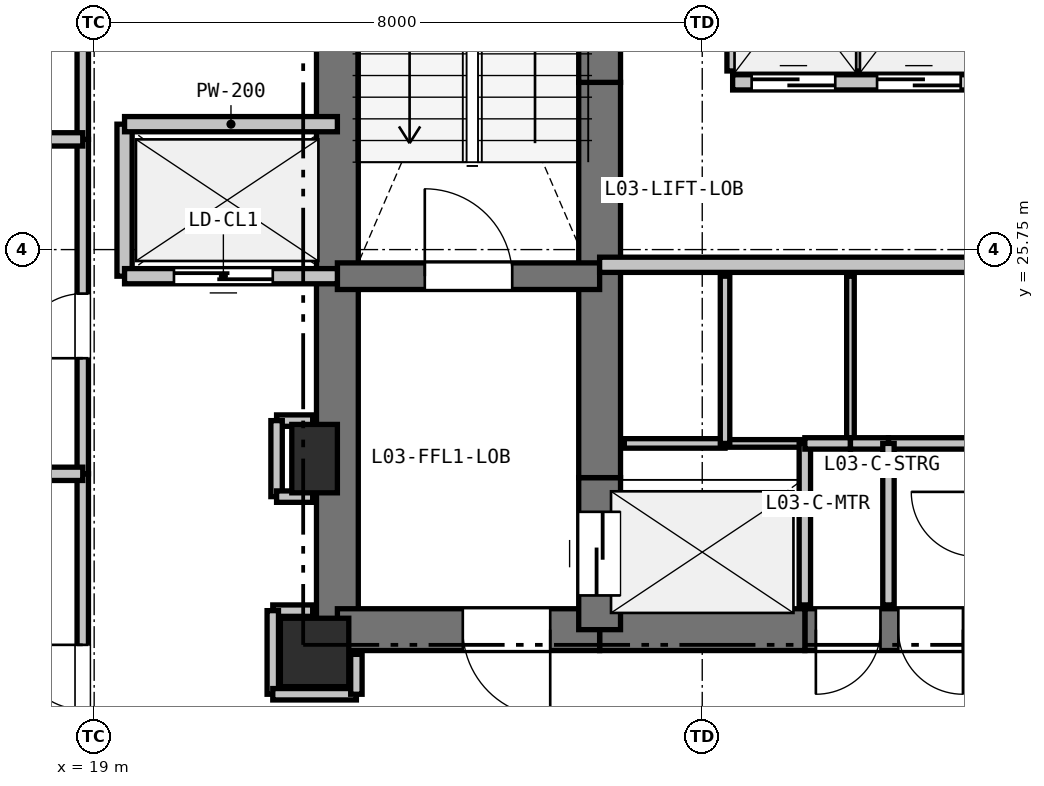
"""IFC4 building model, lengths in metres.
Left out: names, types, materials, properties, quantities, classifications, styles, units other than length and angle.
Written with IfcOpenShell. Run it as: python <this file> out.ifc"""

import sys

from ifc_helpers import new_model, si_unit, direction, frame, frame_2d, origin, origin_2d, place, context, subcontext, project, spatial, rectangle, extrude, element, fill, save


model = new_model("IFC4")
c1 = context("Model", 3, precision=1e-05, world=origin(), true_north=direction((0.0, 1.0)))
c2 = subcontext(c1, "Body", "Model", "MODEL_VIEW")
j1 = project(units=[si_unit("LENGTHUNIT", "METRE"), si_unit("PLANEANGLEUNIT", "RADIAN")], contexts=[c1])
p1 = place(None, origin())
s1 = spatial("IfcSite", under=j1, at=p1, CompositionType="ELEMENT")
p2 = place(p1, origin())
s2 = spatial("IfcBuilding", under=s1, at=p2, CompositionType="ELEMENT")
p3 = place(p2, frame((0.0, 0.0, 14.4)))
s3 = spatial("IfcBuildingStorey", under=s2, at=p3, CompositionType="ELEMENT", Elevation=14.4)
p4 = place(p3, frame((21.9, 20.45, 0.0), z_axis=(0.0, 0.0, 1.0), x_axis=(1.0, 0.0, 0.0)))
e1 = element("IfcColumn", 1, at=p4, inside=s3, PredefinedType="COLUMN", context=c2, shape_type="SweptSolid", body=[
    extrude(rectangle(XDim=0.9, YDim=0.9, at=origin_2d()), origin(), (0.0, 0.0, 1.0), 4.8),
])
p5 = place(p3, frame((21.9, 23.0, 0.0), z_axis=(0.0, 0.0, 1.0), x_axis=(1.0, 0.0, 0.0)))
e2 = element("IfcColumn", 2, at=p5, inside=s3, PredefinedType="PILASTER", context=c2, shape_type="SweptSolid", body=[
    extrude(rectangle(XDim=0.6, YDim=0.9, at=origin_2d()), origin(), (0.0, 0.0, 1.0), 4.8),
])
p6 = place(p3, frame((22.2, 20.75, 0.0), z_axis=(0.0, 0.0, 1.0), x_axis=(0.0, 1.0, 0.0)))
e3 = element("IfcWall", 3, at=p6, inside=s3, PredefinedType="SHEAR", context=c2, shape_type="SweptSolid", body=[
    extrude(rectangle(XDim=4.65, YDim=0.55, at=frame_2d((2.325, 0.0))), origin(), (0.0, 0.0, 1.0), 4.52),
])
p7 = place(p3, frame((22.2, 25.4, 0.0), z_axis=(0.0, 0.0, 1.0), x_axis=(0.0, 1.0, 0.0)))
e4 = element("IfcWall", 4, at=p7, inside=s3, PredefinedType="SHEAR", context=c2, shape_type="SweptSolid", body=[
    extrude(rectangle(XDim=7.35, YDim=0.55, at=frame_2d((3.675, 0.0))), origin(), (0.0, 0.0, 1.0), 4.52),
])
p8 = place(p3, frame((30.6, 20.75, 0.0), z_axis=(0.0, 0.0, 1.0), x_axis=(-1.0, 0.0, 0.0)))
e5 = element("IfcWall", 5, at=p8, inside=s3, PredefinedType="SHEAR", context=c2, shape_type="SweptSolid", body=[
    extrude(rectangle(XDim=2.25, YDim=0.55, at=frame_2d((1.125, 0.0))), origin(), (0.0, 0.0, 1.0), 4.52),
])
p9 = place(p8, frame((1.255, 0.0, 0.0)))
e6 = element("IfcOpeningElement", 6, at=p9, cuts=e5, PredefinedType="OPENING", context=c2, shape_type="SweptSolid", body=[
    extrude(rectangle(XDim=0.85, YDim=2.1, at=frame_2d((0.425, 1.05))), frame((0.0, 0.285, 0.0), z_axis=(0.0, -1.0, 0.0), x_axis=(1.0, 0.0, 0.0)), (0.0, 0.0, 1.0), 0.57),
])
p10 = place(p8, frame((0.17, 0.0, 0.0)))
e7 = element("IfcOpeningElement", 7, at=p10, cuts=e5, PredefinedType="OPENING", context=c2, shape_type="SweptSolid", body=[
    extrude(rectangle(XDim=0.85, YDim=2.1, at=frame_2d((0.425, 1.05))), frame((0.0, 0.285, 0.0), z_axis=(0.0, -1.0, 0.0), x_axis=(1.0, 0.0, 0.0)), (0.0, 0.0, 1.0), 0.57),
])
p11 = place(p3, frame((28.35, 20.75, 0.0), z_axis=(0.0, 0.0, 1.0), x_axis=(-1.0, 0.0, 0.0)))
e8 = element("IfcWall", 8, at=p11, inside=s3, PredefinedType="SHEAR", context=c2, shape_type="SweptSolid", body=[
    extrude(rectangle(XDim=2.7, YDim=0.55, at=frame_2d((1.35, 0.0))), origin(), (0.0, 0.0, 1.0), 4.52),
])
p12 = place(p3, frame((25.65, 20.75, 0.0), z_axis=(0.0, 0.0, 1.0), x_axis=(-1.0, 0.0, 0.0)))
e9 = element("IfcWall", 9, at=p12, inside=s3, PredefinedType="SHEAR", context=c2, shape_type="SweptSolid", body=[
    extrude(rectangle(XDim=3.45, YDim=0.55, at=frame_2d((1.725, 0.0))), origin(), (0.0, 0.0, 1.0), 4.52),
])
p13 = place(p12, frame((0.65, 0.0, 0.0)))
e10 = element("IfcOpeningElement", 10, at=p13, cuts=e9, PredefinedType="OPENING", context=c2, shape_type="SweptSolid", body=[
    extrude(rectangle(XDim=1.15, YDim=2.15, at=frame_2d((0.575, 1.075))), frame((0.0, 0.285, 0.0), z_axis=(0.0, -1.0, 0.0), x_axis=(1.0, 0.0, 0.0)), (0.0, 0.0, 1.0), 0.57),
])
p14 = place(p3, frame((25.65, 20.75, 0.0), z_axis=(0.0, 0.0, 1.0), x_axis=(0.0, 1.0, 0.0)))
e11 = element("IfcWall", 11, at=p14, inside=s3, PredefinedType="SHEAR", context=c2, shape_type="SweptSolid", body=[
    extrude(rectangle(XDim=2.0, YDim=0.55, at=frame_2d((1.0, 0.0))), origin(), (0.0, 0.0, 1.0), 4.52),
])
p15 = place(p14, frame((0.45, 0.0, 0.0)))
e12 = element("IfcOpeningElement", 12, at=p15, cuts=e11, PredefinedType="OPENING", context=c2, shape_type="SweptSolid", body=[
    extrude(rectangle(XDim=1.1, YDim=2.15, at=frame_2d((0.55, 1.075))), frame((0.0, 0.285, 0.0), z_axis=(0.0, -1.0, 0.0), x_axis=(1.0, 0.0, 0.0)), (0.0, 0.0, 1.0), 0.57),
])
p16 = place(p3, frame((25.65, 22.75, 0.0), z_axis=(0.0, 0.0, 1.0), x_axis=(0.0, 1.0, 0.0)))
e13 = element("IfcWall", 13, at=p16, inside=s3, PredefinedType="SHEAR", context=c2, shape_type="SweptSolid", body=[
    extrude(rectangle(XDim=2.8, YDim=0.55, at=frame_2d((1.4, 0.0))), origin(), (0.0, 0.0, 1.0), 4.52),
])
p17 = place(p3, frame((25.65, 25.55, 0.0), z_axis=(0.0, 0.0, 1.0), x_axis=(0.0, 1.0, 0.0)))
e14 = element("IfcWall", 14, at=p17, inside=s3, PredefinedType="SHEAR", context=c2, shape_type="SweptSolid", body=[
    extrude(rectangle(XDim=2.4, YDim=0.55, at=frame_2d((1.2, 0.0))), origin(), (0.0, 0.0, 1.0), 4.52),
])
p18 = place(p3, frame((25.65, 27.95, 0.0), z_axis=(0.0, 0.0, 1.0), x_axis=(0.0, 1.0, 0.0)))
e15 = element("IfcWall", 15, at=p18, inside=s3, PredefinedType="SHEAR", context=c2, shape_type="SweptSolid", body=[
    extrude(rectangle(XDim=4.8, YDim=0.55, at=frame_2d((2.4, 0.0))), origin(), (0.0, 0.0, 1.0), 4.52),
])
p19 = place(p3, frame((22.2, 25.4, 0.0), z_axis=(0.0, 0.0, 1.0), x_axis=(1.0, 0.0, 0.0)))
e16 = element("IfcWall", 16, at=p19, inside=s3, PredefinedType="SHEAR", context=c2, shape_type="SweptSolid", body=[
    extrude(rectangle(XDim=3.45, YDim=0.35, at=frame_2d((1.725, 0.0))), origin(), (0.0, 0.0, 1.0), 4.52),
])
p20 = place(p19, frame((1.15, 0.0, 0.0)))
e17 = element("IfcOpeningElement", 17, at=p20, cuts=e16, PredefinedType="OPENING", context=c2, shape_type="SweptSolid", body=[
    extrude(rectangle(XDim=1.15, YDim=2.15, at=frame_2d((0.575, 1.075))), frame((0.0, 0.185, 0.0), z_axis=(0.0, -1.0, 0.0), x_axis=(1.0, 0.0, 0.0)), (0.0, 0.0, 1.0), 0.37),
])
p21 = place(p3, frame((25.65, 25.55, 0.0), z_axis=(0.0, 0.0, 1.0), x_axis=(1.0, 0.0, 0.0)))
e18 = element("IfcWall", 18, at=p21, inside=s3, PredefinedType="PARTITIONING", context=c2, shape_type="SweptSolid", body=[
    extrude(rectangle(XDim=4.95, YDim=0.2, at=frame_2d((2.475, 0.0))), origin(), (0.0, 0.0, 1.0), 4.52),
])
p22 = place(p3, frame((27.4, 27.95, 0.0), z_axis=(0.0, 0.0, 1.0), x_axis=(1.0, 0.0, 0.0)))
e19 = element("IfcWall", 19, at=p22, inside=s3, PredefinedType="PARTITIONING", context=c2, shape_type="SweptSolid", body=[
    extrude(rectangle(XDim=4.95, YDim=0.2, at=frame_2d((2.475, 0.0))), origin(), (0.0, 0.0, 1.0), 4.52),
])
p23 = place(p22, frame((0.25, 0.0, 0.0)))
e20 = element("IfcOpeningElement", 20, at=p23, cuts=e19, PredefinedType="OPENING", context=c2, shape_type="SweptSolid", body=[
    extrude(rectangle(XDim=1.1, YDim=2.15, at=frame_2d((0.55, 1.075))), frame((0.0, 0.11, 0.0), z_axis=(0.0, -1.0, 0.0), x_axis=(1.0, 0.0, 0.0)), (0.0, 0.0, 1.0), 0.22),
])
p24 = place(p22, frame((1.9, 0.0, 0.0)))
e21 = element("IfcOpeningElement", 21, at=p24, cuts=e19, PredefinedType="OPENING", context=c2, shape_type="SweptSolid", body=[
    extrude(rectangle(XDim=1.1, YDim=2.15, at=frame_2d((0.55, 1.075))), frame((0.0, 0.11, 0.0), z_axis=(0.0, -1.0, 0.0), x_axis=(1.0, 0.0, 0.0)), (0.0, 0.0, 1.0), 0.22),
])
p25 = place(p22, frame((3.55, 0.0, 0.0)))
e22 = element("IfcOpeningElement", 22, at=p25, cuts=e19, PredefinedType="OPENING", context=c2, shape_type="SweptSolid", body=[
    extrude(rectangle(XDim=1.1, YDim=2.15, at=frame_2d((0.55, 1.075))), frame((0.0, 0.11, 0.0), z_axis=(0.0, -1.0, 0.0), x_axis=(1.0, 0.0, 0.0)), (0.0, 0.0, 1.0), 0.22),
])
p26 = place(p3, frame((19.4, 25.4, 0.0), z_axis=(0.0, 0.0, 1.0), x_axis=(0.0, 1.0, 0.0)))
e23 = element("IfcWall", 23, at=p26, inside=s3, PredefinedType="PARTITIONING", context=c2, shape_type="SweptSolid", body=[
    extrude(rectangle(XDim=2.0, YDim=0.2, at=frame_2d((1.0, 0.0))), origin(), (0.0, 0.0, 1.0), 4.52),
])
p27 = place(p3, frame((19.4, 27.4, 0.0), z_axis=(0.0, 0.0, 1.0), x_axis=(1.0, 0.0, 0.0)))
e24 = element("IfcWall", 24, at=p27, inside=s3, PredefinedType="PARTITIONING", context=c2, shape_type="SweptSolid", body=[
    extrude(rectangle(XDim=2.8, YDim=0.2, at=frame_2d((1.4, 0.0))), origin(), (0.0, 0.0, 1.0), 3.969),
])
p28 = place(p3, frame((22.2, 25.4, 0.0), z_axis=(0.0, 0.0, 1.0), x_axis=(-1.0, 0.0, 0.0)))
e25 = element("IfcWall", 25, at=p28, inside=s3, PredefinedType="PARTITIONING", context=c2, shape_type="SweptSolid", body=[
    extrude(rectangle(XDim=2.8, YDim=0.2, at=frame_2d((1.4, 0.0))), origin(), (0.0, 0.0, 1.0), 3.969),
])
p29 = place(p28, frame((0.85, 0.0, 0.0)))
e26 = element("IfcOpeningElement", 26, at=p29, cuts=e25, PredefinedType="OPENING", context=c2, shape_type="SweptSolid", body=[
    extrude(rectangle(XDim=1.3, YDim=2.2, at=frame_2d((0.65, 1.1))), frame((0.0, 0.11, 0.0), z_axis=(0.0, -1.0, 0.0), x_axis=(1.0, 0.0, 0.0)), (0.0, 0.0, 1.0), 0.22),
])
p30 = place(p3, frame((25.975, 23.2, 0.0), z_axis=(0.0, 0.0, 1.0), x_axis=(1.0, 0.0, 0.0)))
e27 = element("IfcWall", 27, at=p30, inside=s3, PredefinedType="PARTITIONING", context=c2, shape_type="SweptSolid", body=[
    extrude(rectangle(XDim=1.325, YDim=0.125, at=frame_2d((0.663, 0.0))), origin(), (0.0, 0.0, 1.0), 4.52),
])
p31 = place(p3, frame((27.3, 23.2, 0.0), z_axis=(0.0, 0.0, 1.0), x_axis=(1.0, 0.0, 0.0)))
e28 = element("IfcWall", 28, at=p31, inside=s3, PredefinedType="PARTITIONING", context=c2, shape_type="SweptSolid", body=[
    extrude(rectangle(XDim=1.05, YDim=0.1, at=frame_2d((0.525, 0.0))), origin(), (0.0, 0.0, 1.0), 4.52),
])
p32 = place(p3, frame((28.35, 23.2, 0.0), z_axis=(0.0, 0.0, 1.0), x_axis=(0.0, -1.0, 0.0)))
e29 = element("IfcWall", 29, at=p32, inside=s3, PredefinedType="PARTITIONING", context=c2, shape_type="SweptSolid", body=[
    extrude(rectangle(XDim=2.125, YDim=0.15, at=frame_2d((1.062, 0.0))), origin(), (0.0, 0.0, 1.0), 4.52),
])
p33 = place(p3, frame((27.3, 25.4, 0.0), z_axis=(0.0, 0.0, 1.0), x_axis=(0.0, -1.0, 0.0)))
e30 = element("IfcWall", 30, at=p33, inside=s3, PredefinedType="PARTITIONING", context=c2, shape_type="SweptSolid", body=[
    extrude(rectangle(XDim=2.2, YDim=0.125, at=frame_2d((1.1, 0.0))), origin(), (0.0, 0.0, 1.0), 4.52),
])
p34 = place(p3, frame((28.95, 25.4, 0.0), z_axis=(0.0, 0.0, 1.0), x_axis=(0.0, -1.0, 0.0)))
e31 = element("IfcWall", 31, at=p34, inside=s3, PredefinedType="PARTITIONING", context=c2, shape_type="SweptSolid", body=[
    extrude(rectangle(XDim=2.2, YDim=0.1, at=frame_2d((1.1, 0.0))), origin(), (0.0, 0.0, 1.0), 4.52),
])
p35 = place(p3, frame((28.95, 23.2, 0.0), z_axis=(0.0, 0.0, 1.0), x_axis=(-1.0, 0.0, 0.0)))
e32 = element("IfcWall", 32, at=p35, inside=s3, PredefinedType="PARTITIONING", context=c2, shape_type="SweptSolid", body=[
    extrude(rectangle(XDim=0.6, YDim=0.15, at=frame_2d((0.3, 0.0))), origin(), (0.0, 0.0, 1.0), 4.52),
])
p36 = place(p3, frame((30.6, 23.2, 0.0), z_axis=(0.0, 0.0, 1.0), x_axis=(-1.0, 0.0, 0.0)))
e33 = element("IfcWall", 33, at=p36, inside=s3, PredefinedType="PARTITIONING", context=c2, shape_type="SweptSolid", body=[
    extrude(rectangle(XDim=1.15, YDim=0.15, at=frame_2d((0.575, 0.0))), origin(), (0.0, 0.0, 1.0), 4.52),
])
p37 = place(p3, frame((29.45, 23.2, 0.0), z_axis=(0.0, 0.0, 1.0), x_axis=(-1.0, 0.0, 0.0)))
e34 = element("IfcWall", 34, at=p37, inside=s3, PredefinedType="PARTITIONING", context=c2, shape_type="SweptSolid", body=[
    extrude(rectangle(XDim=0.5, YDim=0.15, at=frame_2d((0.25, 0.0))), origin(), (0.0, 0.0, 1.0), 4.52),
])
p38 = place(p3, frame((29.05, 30.3, 0.0), z_axis=(0.0, 0.0, 1.0), x_axis=(0.0, -1.0, 0.0)))
e35 = element("IfcWall", 35, at=p38, inside=s3, PredefinedType="PARTITIONING", context=c2, shape_type="SweptSolid", body=[
    extrude(rectangle(XDim=2.2, YDim=0.1, at=frame_2d((1.1, 0.0))), origin(), (0.0, 0.0, 1.0), 4.52),
])
p39 = place(p3, frame((27.4, 28.1, 0.0), z_axis=(0.0, 0.0, 1.0), x_axis=(0.0, 1.0, 0.0)))
e36 = element("IfcWall", 36, at=p39, inside=s3, PredefinedType="PARTITIONING", context=c2, shape_type="SweptSolid", body=[
    extrude(rectangle(XDim=2.2, YDim=0.15, at=frame_2d((1.1, 0.0))), origin(), (0.0, 0.0, 1.0), 4.52),
])
p40 = place(p3, frame((21.875, 21.0, 0.0), z_axis=(0.0, 0.0, 1.0), x_axis=(-1.0, 0.0, 0.0)))
e37 = element("IfcWall", 37, at=p40, inside=s3, PredefinedType="PARTITIONING", context=c2, shape_type="SweptSolid", body=[
    extrude(rectangle(XDim=0.525, YDim=0.15, at=frame_2d((0.262, 0.0))), origin(), (0.0, 0.0, 1.0), 3.969),
])
p41 = place(p3, frame((21.35, 21.0, 0.0), z_axis=(0.0, 0.0, 1.0), x_axis=(0.0, -1.0, 0.0)))
e38 = element("IfcWall", 38, at=p41, inside=s3, PredefinedType="PARTITIONING", context=c2, shape_type="SweptSolid", body=[
    extrude(rectangle(XDim=1.1, YDim=0.15, at=frame_2d((0.55, 0.0))), origin(), (0.0, 0.0, 1.0), 3.818),
])
p42 = place(p3, frame((21.35, 19.9, 0.0), z_axis=(0.0, 0.0, 1.0), x_axis=(1.0, 0.0, 0.0)))
e39 = element("IfcWall", 39, at=p42, inside=s3, PredefinedType="PARTITIONING", context=c2, shape_type="SweptSolid", body=[
    extrude(rectangle(XDim=1.1, YDim=0.15, at=frame_2d((0.55, 0.0))), origin(), (0.0, 0.0, 1.0), 3.818),
])
p43 = place(p3, frame((22.45, 19.9, 0.0), z_axis=(0.0, 0.0, 1.0), x_axis=(0.0, 1.0, 0.0)))
e40 = element("IfcWall", 40, at=p43, inside=s3, PredefinedType="PARTITIONING", context=c2, shape_type="SweptSolid", body=[
    extrude(rectangle(XDim=0.525, YDim=0.15, at=frame_2d((0.263, 0.0))), origin(), (0.0, 0.0, 1.0), 3.818),
])
p44 = place(p3, frame((18.85, 17.45, 0.0), z_axis=(0.0, 0.0, 1.0), x_axis=(0.0, 1.0, 0.0)))
e41 = element("IfcWall", 41, at=p44, inside=s3, PredefinedType="PARTITIONING", context=c2, shape_type="SweptSolid", body=[
    extrude(rectangle(XDim=5.35, YDim=0.15, at=frame_2d((2.675, 0.0))), origin(), (0.0, 0.0, 1.0), 3.818),
])
p45 = place(p44, frame((2.25, 0.0, 0.0)))
e42 = element("IfcOpeningElement", 42, at=p45, cuts=e41, PredefinedType="OPENING", context=c2, shape_type="SweptSolid", body=[
    extrude(rectangle(XDim=0.85, YDim=2.1, at=frame_2d((0.425, 1.05))), frame((0.0, 0.085, 0.0), z_axis=(0.0, -1.0, 0.0), x_axis=(1.0, 0.0, 0.0)), (0.0, 0.0, 1.0), 0.17),
])
p46 = place(p3, frame((18.85, 22.8, 0.0), z_axis=(0.0, 0.0, 1.0), x_axis=(0.0, 1.0, 0.0)))
e43 = element("IfcWall", 43, at=p46, inside=s3, PredefinedType="PARTITIONING", context=c2, shape_type="SweptSolid", body=[
    extrude(rectangle(XDim=4.4, YDim=0.15, at=frame_2d((2.2, 0.0))), origin(), (0.0, 0.0, 1.0), 4.52),
])
p47 = place(p46, frame((1.521, 0.0, 0.0)))
e44 = element("IfcOpeningElement", 44, at=p47, cuts=e43, PredefinedType="OPENING", context=c2, shape_type="SweptSolid", body=[
    extrude(rectangle(XDim=0.85, YDim=2.1, at=frame_2d((0.425, 1.05))), frame((0.0, 0.085, 0.0), z_axis=(0.0, -1.0, 0.0), x_axis=(1.0, 0.0, 0.0)), (0.0, 0.0, 1.0), 0.17),
])
p48 = place(p3, frame((18.85, 27.2, 0.0), z_axis=(0.0, 0.0, 1.0), x_axis=(0.0, 1.0, 0.0)))
e45 = element("IfcWall", 45, at=p48, inside=s3, PredefinedType="PARTITIONING", context=c2, shape_type="SweptSolid", body=[
    extrude(rectangle(XDim=8.85, YDim=0.15, at=frame_2d((4.425, 0.0))), origin(), (0.0, 0.0, 1.0), 3.818),
])
p49 = place(p48, frame((3.925, 0.0, 0.0)))
e46 = element("IfcOpeningElement", 46, at=p49, cuts=e45, PredefinedType="OPENING", context=c2, shape_type="SweptSolid", body=[
    extrude(rectangle(XDim=1.0, YDim=2.15, at=frame_2d((0.5, 1.075))), frame((0.0, 0.085, 0.0), z_axis=(0.0, -1.0, 0.0), x_axis=(1.0, 0.0, 0.0)), (0.0, 0.0, 1.0), 0.17),
])
p50 = place(p3, frame((21.875, 23.5, 0.0), z_axis=(0.0, 0.0, 1.0), x_axis=(-1.0, 0.0, 0.0)))
e47 = element("IfcWall", 47, at=p50, inside=s3, PredefinedType="PARTITIONING", context=c2, shape_type="SweptSolid", body=[
    extrude(rectangle(XDim=0.475, YDim=0.15, at=frame_2d((0.238, 0.0))), origin(), (0.0, 0.0, 1.0), 3.969),
])
p51 = place(p3, frame((21.4, 23.5, 0.0), z_axis=(0.0, 0.0, 1.0), x_axis=(0.0, -1.0, 0.0)))
e48 = element("IfcWall", 48, at=p51, inside=s3, PredefinedType="PARTITIONING", context=c2, shape_type="SweptSolid", body=[
    extrude(rectangle(XDim=1.0, YDim=0.15, at=frame_2d((0.5, 0.0))), origin(), (0.0, 0.0, 1.0), 4.52),
])
p52 = place(p3, frame((21.4, 22.5, 0.0), z_axis=(0.0, 0.0, 1.0), x_axis=(1.0, 0.0, 0.0)))
e49 = element("IfcWall", 49, at=p52, inside=s3, PredefinedType="PARTITIONING", context=c2, shape_type="SweptSolid", body=[
    extrude(rectangle(XDim=0.475, YDim=0.15, at=frame_2d((0.238, 0.0))), origin(), (0.0, 0.0, 1.0), 3.969),
])
p53 = place(p3, frame((6.435, 22.8, 0.0), z_axis=(0.0, 0.0, 1.0), x_axis=(1.0, 0.0, 0.0)))
e50 = element("IfcWall", 50, at=p53, inside=s3, PredefinedType="PLUMBINGWALL", context=c2, shape_type="SweptSolid", body=[
    extrude(rectangle(XDim=12.415, YDim=0.175, at=frame_2d((6.208, 0.0))), origin(), (0.0, 0.0, 1.0), 3.818),
])
p54 = place(p3, frame((3.975, 27.2, 0.0), z_axis=(0.0, 0.0, 1.0), x_axis=(1.0, 0.0, 0.0)))
e51 = element("IfcWall", 51, at=p54, inside=s3, PredefinedType="PLUMBINGWALL", context=c2, shape_type="SweptSolid", body=[
    extrude(rectangle(XDim=14.875, YDim=0.175, at=frame_2d((7.438, 0.0))), origin(), (0.0, 0.0, 1.0), 4.131),
])
p55 = place(p3, frame((29.45, 23.2, 0.0), z_axis=(0.0, 0.0, 1.0), x_axis=(0.0, -1.0, 0.0)))
e52 = element("IfcWall", 52, at=p55, inside=s3, PredefinedType="PARTITIONING", context=c2, shape_type="SweptSolid", body=[
    extrude(rectangle(XDim=2.125, YDim=0.15, at=frame_2d((1.062, 0.0))), origin(), (0.0, 0.0, 1.0), 4.52),
])
p56 = place(p23, origin())
e53 = element("IfcDoor", 53, at=p56, inside=s3, OperationType="SLIDING_TO_LEFT", PredefinedType="DOOR", context=c2, shape_type="SweptSolid", body=[
    extrude(rectangle(XDim=1.1, YDim=2.15, at=frame_2d((0.55, 1.075))), frame((0.0, 0.025, 0.0), z_axis=(0.0, -1.0, 0.0), x_axis=(1.0, 0.0, 0.0)), (0.0, 0.0, 1.0), 0.05),
])
fill(e20, e53)
p57 = place(p24, origin())
e54 = element("IfcDoor", 54, at=p57, inside=s3, OperationType="SLIDING_TO_LEFT", PredefinedType="DOOR", context=c2, shape_type="SweptSolid", body=[
    extrude(rectangle(XDim=1.1, YDim=2.15, at=frame_2d((0.55, 1.075))), frame((0.0, 0.025, 0.0), z_axis=(0.0, -1.0, 0.0), x_axis=(1.0, 0.0, 0.0)), (0.0, 0.0, 1.0), 0.05),
])
fill(e21, e54)
p58 = place(p15, origin())
e55 = element("IfcDoor", 55, at=p58, inside=s3, OperationType="SLIDING_TO_LEFT", PredefinedType="DOOR", context=c2, shape_type="SweptSolid", body=[
    extrude(rectangle(XDim=1.1, YDim=2.15, at=frame_2d((0.55, 1.075))), frame((0.0, 0.025, 0.0), z_axis=(0.0, -1.0, 0.0), x_axis=(1.0, 0.0, 0.0)), (0.0, 0.0, 1.0), 0.05),
])
fill(e12, e55)
p59 = place(p29, origin())
e56 = element("IfcDoor", 56, at=p59, inside=s3, OperationType="SLIDING_TO_LEFT", PredefinedType="DOOR", context=c2, shape_type="SweptSolid", body=[
    extrude(rectangle(XDim=1.3, YDim=2.2, at=frame_2d((0.65, 1.1))), frame((0.0, 0.025, 0.0), z_axis=(0.0, -1.0, 0.0), x_axis=(1.0, 0.0, 0.0)), (0.0, 0.0, 1.0), 0.05),
])
fill(e26, e56)
p60 = place(p20, origin())
e57 = element("IfcDoor", 57, at=p60, inside=s3, OperationType="SINGLE_SWING_LEFT", PredefinedType="DOOR", context=c2, shape_type="SweptSolid", body=[
    extrude(rectangle(XDim=1.15, YDim=2.15, at=frame_2d((0.575, 1.075))), frame((0.0, 0.025, 0.0), z_axis=(0.0, -1.0, 0.0), x_axis=(1.0, 0.0, 0.0)), (0.0, 0.0, 1.0), 0.05),
])
fill(e17, e57)
p61 = place(p13, origin())
e58 = element("IfcDoor", 58, at=p61, inside=s3, OperationType="SINGLE_SWING_LEFT", PredefinedType="DOOR", context=c2, shape_type="SweptSolid", body=[
    extrude(rectangle(XDim=1.15, YDim=2.15, at=frame_2d((0.575, 1.075))), frame((0.0, 0.025, 0.0), z_axis=(0.0, -1.0, 0.0), x_axis=(1.0, 0.0, 0.0)), (0.0, 0.0, 1.0), 0.05),
])
fill(e10, e58)
p62 = place(p45, origin())
e59 = element("IfcDoor", 59, at=p62, inside=s3, OperationType="SINGLE_SWING_RIGHT", PredefinedType="DOOR", context=c2, shape_type="SweptSolid", body=[
    extrude(rectangle(XDim=0.85, YDim=2.1, at=frame_2d((0.425, 1.05))), frame((0.0, 0.025, 0.0), z_axis=(0.0, -1.0, 0.0), x_axis=(1.0, 0.0, 0.0)), (0.0, 0.0, 1.0), 0.05),
])
fill(e42, e59)
p63 = place(p47, origin())
e60 = element("IfcDoor", 60, at=p63, inside=s3, OperationType="SINGLE_SWING_LEFT", PredefinedType="DOOR", context=c2, shape_type="SweptSolid", body=[
    extrude(rectangle(XDim=0.85, YDim=2.1, at=frame_2d((0.425, 1.05))), frame((0.0, 0.025, 0.0), z_axis=(0.0, -1.0, 0.0), x_axis=(1.0, 0.0, 0.0)), (0.0, 0.0, 1.0), 0.05),
])
fill(e44, e60)
p64 = place(p9, origin())
e61 = element("IfcDoor", 61, at=p64, inside=s3, OperationType="SINGLE_SWING_RIGHT", PredefinedType="DOOR", context=c2, shape_type="SweptSolid", body=[
    extrude(rectangle(XDim=0.85, YDim=2.1, at=frame_2d((0.425, 1.05))), frame((0.0, 0.025, 0.0), z_axis=(0.0, -1.0, 0.0), x_axis=(1.0, 0.0, 0.0)), (0.0, 0.0, 1.0), 0.05),
])
fill(e6, e61)
p65 = place(p10, origin())
e62 = element("IfcDoor", 62, at=p65, inside=s3, OperationType="SINGLE_SWING_LEFT", PredefinedType="DOOR", context=c2, shape_type="SweptSolid", body=[
    extrude(rectangle(XDim=0.85, YDim=2.1, at=frame_2d((0.425, 1.05))), frame((0.0, 0.025, 0.0), z_axis=(0.0, -1.0, 0.0), x_axis=(1.0, 0.0, 0.0)), (0.0, 0.0, 1.0), 0.05),
])
fill(e7, e62)
save(model, sys.argv[1])
